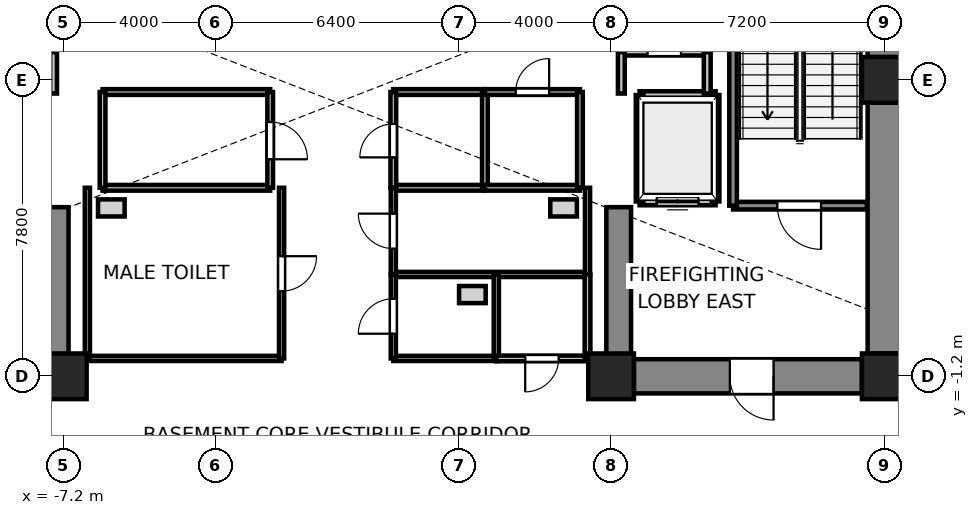
"""IFC4 building model, lengths in metres.
Left out: names, types, materials, properties, quantities, classifications, styles, units other than length and angle.
Written with IfcOpenShell. Run it as: python <this file> out.ifc"""

import sys

from ifc_helpers import new_model, si_unit, direction, frame, frame_2d, origin, origin_2d, place, context, subcontext, project, spatial, rectangle, extrude, source, transform, mapped, element, fill, save


model = new_model("IFC4")
c1 = context("Model", 3, precision=1e-05, world=origin(), true_north=direction((0.0, 1.0)))
c2 = subcontext(c1, "Body", "Model", "MODEL_VIEW")
j1 = project(units=[si_unit("LENGTHUNIT", "METRE"), si_unit("PLANEANGLEUNIT", "RADIAN")], contexts=[c1])
p1 = place(None, origin())
s1 = spatial("IfcSite", under=j1, at=p1, CompositionType="ELEMENT")
p2 = place(p1, origin())
s2 = spatial("IfcBuilding", under=s1, at=p2, CompositionType="ELEMENT")
p3 = place(p2, frame((0.0, 0.0, -13.2)))
s3 = spatial("IfcBuildingStorey", under=s2, at=p3, CompositionType="ELEMENT", Elevation=-13.2)
for number, where, z_axis, x_axis in (
    (1, (-7.2, -1.2, 0.0), (0.0, 0.0, 1.0), (1.0, 0.0, 0.0)),
    (2, (7.2, -1.2, 0.0), (0.0, 0.0, 1.0), (1.0, 0.0, 0.0)),
    (3, (14.4, -1.2, 0.0), (0.0, 0.0, 1.0), (1.0, 0.0, 0.0)),
    (4, (14.4, 6.6, 0.0), (0.0, 0.0, 1.0), (1.0, 0.0, 0.0)),
):
    element("IfcColumn", number, at=place(p3, frame(where, z_axis=z_axis, x_axis=x_axis)), inside=s3, PredefinedType="COLUMN", context=c2, shape_type="SweptSolid", body=[
        extrude(rectangle(XDim=1.2, YDim=1.2, at=origin_2d()), origin(), (0.0, 0.0, 1.0), 4.4),
    ])
p4 = place(p3, frame((14.4, -0.6, 0.0), z_axis=(0.0, 0.0, 1.0), x_axis=(0.0, 1.0, 0.0)))
e5 = element("IfcWall", 5, at=p4, inside=s3, PredefinedType="SHEAR", context=c2, shape_type="SweptSolid", body=[
    extrude(rectangle(XDim=6.6, YDim=0.9, at=frame_2d((3.3, 0.0))), origin(), (0.0, 0.0, 1.0), 4.12),
])
p5 = place(p3, frame((14.4, 7.2, 0.0), z_axis=(0.0, 0.0, 1.0), x_axis=(0.0, 1.0, 0.0)))
e6 = element("IfcWall", 6, at=p5, inside=s3, PredefinedType="SHEAR", context=c2, shape_type="SweptSolid", body=[
    extrude(rectangle(XDim=5.7, YDim=0.9, at=frame_2d((2.85, 0.0))), origin(), (0.0, 0.0, 1.0), 4.12),
])
p6 = place(p3, frame((13.8, -1.2, 0.0), z_axis=(0.0, 0.0, 1.0), x_axis=(-1.0, 0.0, 0.0)))
e7 = element("IfcWall", 7, at=p6, inside=s3, PredefinedType="SHEAR", context=c2, shape_type="SweptSolid", body=[
    extrude(rectangle(XDim=6.0, YDim=0.9, at=frame_2d((3.0, 0.0))), origin(), (0.0, 0.0, 1.0), 4.12),
])
p7 = place(p6, frame((2.325, 0.0, 0.0)))
e8 = element("IfcOpeningElement", 8, at=p7, cuts=e7, PredefinedType="OPENING", context=c2, shape_type="SweptSolid", body=[
    extrude(rectangle(XDim=1.15, YDim=2.15, at=frame_2d((0.575, 1.075))), frame((0.0, 0.46, 0.0), z_axis=(0.0, -1.0, 0.0), x_axis=(1.0, 0.0, 0.0)), (0.0, 0.0, 1.0), 0.92),
])
for number, where, z_axis, x_axis in (
    (9, (-7.4, -0.75, 0.0), (0.0, 0.0, 1.0), (0.0, 1.0, 0.0)),
    (10, (7.4, -0.75, 0.0), (0.0, 0.0, 1.0), (0.0, 1.0, 0.0)),
):
    element("IfcWall", number, at=place(p3, frame(where, z_axis=z_axis, x_axis=x_axis)), inside=s3, PredefinedType="SHEAR", context=c2, shape_type="SweptSolid", body=[
        extrude(rectangle(XDim=4.0, YDim=0.65, at=frame_2d((2.0, 0.0))), origin(), (0.0, 0.0, 1.0), 4.12),
    ])
p8 = place(p3, frame((9.95, 3.4, 0.0), z_axis=(0.0, 0.0, 1.0), x_axis=(-1.0, 0.0, 0.0)))
e11 = element("IfcWall", 11, at=p8, inside=s3, PredefinedType="SOLIDWALL", context=c2, shape_type="SweptSolid", body=[
    extrude(rectangle(XDim=2.0, YDim=0.2, at=frame_2d((1.0, 0.0))), origin(), (0.0, 0.0, 1.0), 4.12),
])
p9 = place(p8, frame((0.45, 0.0, 0.0)))
e12 = element("IfcOpeningElement", 12, at=p9, cuts=e11, PredefinedType="OPENING", context=c2, shape_type="SweptSolid", body=[
    extrude(rectangle(XDim=1.1, YDim=2.2, at=frame_2d((0.55, 1.1))), frame((0.0, 0.11, 0.0), z_axis=(0.0, -1.0, 0.0), x_axis=(1.0, 0.0, 0.0)), (0.0, 0.0, 1.0), 0.22),
])
p10 = place(p3, frame((7.95, 6.2, 0.0), z_axis=(0.0, 0.0, 1.0), x_axis=(1.0, 0.0, 0.0)))
e13 = element("IfcWall", 13, at=p10, inside=s3, PredefinedType="SOLIDWALL", context=c2, shape_type="SweptSolid", body=[
    extrude(rectangle(XDim=2.0, YDim=0.2, at=frame_2d((1.0, 0.0))), origin(), (0.0, 0.0, 1.0), 4.12),
])
for number, where, z_axis, x_axis in (
    (14, (7.95, 3.4, 0.0), (0.0, 0.0, 1.0), (0.0, 1.0, 0.0)),
    (15, (9.95, 6.2, 0.0), (0.0, 0.0, 1.0), (0.0, -1.0, 0.0)),
):
    element("IfcWall", number, at=place(p3, frame(where, z_axis=z_axis, x_axis=x_axis)), inside=s3, PredefinedType="SOLIDWALL", context=c2, shape_type="SweptSolid", body=[
        extrude(rectangle(XDim=2.8, YDim=0.2, at=frame_2d((1.4, 0.0))), origin(), (0.0, 0.0, 1.0), 4.12),
    ])
p11 = place(p3, frame((13.93, 3.29, 0.0), z_axis=(0.0, 0.0, 1.0), x_axis=(-1.0, 0.0, 0.0)))
e16 = element("IfcWall", 16, at=p11, inside=s3, PredefinedType="SOLIDWALL", context=c2, shape_type="SweptSolid", body=[
    extrude(rectangle(XDim=3.52, YDim=0.2, at=frame_2d((1.76, 0.0))), origin(), (0.0, 0.0, 1.0), 4.12),
])
p12 = place(p11, frame((1.205, 0.0, 0.0)))
e17 = element("IfcOpeningElement", 17, at=p12, cuts=e16, PredefinedType="OPENING", context=c2, shape_type="SweptSolid", body=[
    extrude(rectangle(XDim=1.15, YDim=2.15, at=frame_2d((0.575, 1.075))), frame((0.0, 0.11, 0.0), z_axis=(0.0, -1.0, 0.0), x_axis=(1.0, 0.0, 0.0)), (0.0, 0.0, 1.0), 0.22),
])
p13 = place(p3, frame((10.41, 3.29, 0.0), z_axis=(0.0, 0.0, 1.0), x_axis=(0.0, 1.0, 0.0)))
e18 = element("IfcWall", 18, at=p13, inside=s3, PredefinedType="SOLIDWALL", context=c2, shape_type="SweptSolid", body=[
    extrude(rectangle(XDim=8.84, YDim=0.2, at=frame_2d((4.42, 0.0))), origin(), (0.0, 0.0, 1.0), 4.12),
])
p14 = place(p3, frame((-9.73, 7.33, 0.0), z_axis=(0.0, 0.0, 1.0), x_axis=(1.0, 0.0, 0.0)))
e19 = element("IfcWall", 19, at=p14, inside=s3, PredefinedType="PARTITIONING", context=c2, shape_type="SweptSolid", body=[
    extrude(rectangle(XDim=2.26, YDim=0.18, at=frame_2d((1.13, 0.0))), origin(), (0.0, 0.0, 1.0), 3.41),
])
p15 = place(p14, frame((0.69, 0.0, 0.0)))
e20 = element("IfcOpeningElement", 20, at=p15, cuts=e19, PredefinedType="OPENING", context=c2, shape_type="SweptSolid", body=[
    extrude(rectangle(XDim=0.88, YDim=2.1, at=frame_2d((0.44, 1.05))), frame((0.0, 0.1, 0.0), z_axis=(0.0, -1.0, 0.0), x_axis=(1.0, 0.0, 0.0)), (0.0, 0.0, 1.0), 0.2),
])
p16 = place(p3, frame((-7.47, 7.33, 0.0), z_axis=(0.0, 0.0, 1.0), x_axis=(0.0, -1.0, 0.0)))
e21 = element("IfcWall", 21, at=p16, inside=s3, PredefinedType="PARTITIONING", context=c2, shape_type="SweptSolid", body=[
    extrude(rectangle(XDim=1.09, YDim=0.18, at=frame_2d((0.545, 0.0))), origin(), (0.0, 0.0, 1.0), 3.41),
])
p17 = place(p3, frame((7.47, 7.33, 0.0), z_axis=(0.0, 0.0, 1.0), x_axis=(1.0, 0.0, 0.0)))
e22 = element("IfcWall", 22, at=p17, inside=s3, PredefinedType="PARTITIONING", context=c2, shape_type="SweptSolid", body=[
    extrude(rectangle(XDim=2.26, YDim=0.18, at=frame_2d((1.13, 0.0))), origin(), (0.0, 0.0, 1.0), 3.41),
])
p18 = place(p17, frame((0.69, 0.0, 0.0)))
e23 = element("IfcOpeningElement", 23, at=p18, cuts=e22, PredefinedType="OPENING", context=c2, shape_type="SweptSolid", body=[
    extrude(rectangle(XDim=0.88, YDim=2.1, at=frame_2d((0.44, 1.05))), frame((0.0, 0.1, 0.0), z_axis=(0.0, -1.0, 0.0), x_axis=(1.0, 0.0, 0.0)), (0.0, 0.0, 1.0), 0.2),
])
p19 = place(p3, frame((7.47, 6.24, 0.0), z_axis=(0.0, 0.0, 1.0), x_axis=(0.0, 1.0, 0.0)))
e24 = element("IfcWall", 24, at=p19, inside=s3, PredefinedType="PARTITIONING", context=c2, shape_type="SweptSolid", body=[
    extrude(rectangle(XDim=1.09, YDim=0.18, at=frame_2d((0.545, 0.0))), origin(), (0.0, 0.0, 1.0), 3.41),
])
p20 = place(p3, frame((9.73, 7.33, 0.0), z_axis=(0.0, 0.0, 1.0), x_axis=(0.0, -1.0, 0.0)))
e25 = element("IfcWall", 25, at=p20, inside=s3, PredefinedType="PARTITIONING", context=c2, shape_type="SweptSolid", body=[
    extrude(rectangle(XDim=1.09, YDim=0.18, at=frame_2d((0.545, 0.0))), origin(), (0.0, 0.0, 1.0), 4.12),
])
for number, where, z_axis, x_axis in (
    (26, (-1.77, 3.76, 0.0), (0.0, 0.0, 1.0), (-1.0, 0.0, 0.0)),
    (27, (-6.18, 6.28, 0.0), (0.0, 0.0, 1.0), (1.0, 0.0, 0.0)),
):
    element("IfcWall", number, at=place(p3, frame(where, z_axis=z_axis, x_axis=x_axis)), inside=s3, PredefinedType="PARTITIONING", context=c2, shape_type="SweptSolid", body=[
        extrude(rectangle(XDim=4.41, YDim=0.15, at=frame_2d((2.205, 0.0))), origin(), (0.0, 0.0, 1.0), 4.12),
    ])
p21 = place(p3, frame((-6.18, 3.76, 0.0), z_axis=(0.0, 0.0, 1.0), x_axis=(0.0, 1.0, 0.0)))
e28 = element("IfcWall", 28, at=p21, inside=s3, PredefinedType="PARTITIONING", context=c2, shape_type="SweptSolid", body=[
    extrude(rectangle(XDim=2.52, YDim=0.15, at=frame_2d((1.26, 0.0))), origin(), (0.0, 0.0, 1.0), 4.12),
])
p22 = place(p3, frame((-1.77, 6.28, 0.0), z_axis=(0.0, 0.0, 1.0), x_axis=(0.0, -1.0, 0.0)))
e29 = element("IfcWall", 29, at=p22, inside=s3, PredefinedType="PARTITIONING", context=c2, shape_type="SweptSolid", body=[
    extrude(rectangle(XDim=2.52, YDim=0.15, at=frame_2d((1.26, 0.0))), origin(), (0.0, 0.0, 1.0), 4.12),
])
p23 = place(p22, frame((0.79, 0.0, 0.0)))
e30 = element("IfcOpeningElement", 30, at=p23, cuts=e29, PredefinedType="OPENING", context=c2, shape_type="SweptSolid", body=[
    extrude(rectangle(XDim=0.98, YDim=2.15, at=frame_2d((0.49, 1.075))), frame((0.0, 0.085, 0.0), z_axis=(0.0, -1.0, 0.0), x_axis=(1.0, 0.0, 0.0)), (0.0, 0.0, 1.0), 0.17),
])
for number, where, z_axis, x_axis in (
    (31, (3.88, 3.76, 0.0), (0.0, 0.0, 1.0), (-1.0, 0.0, 0.0)),
    (32, (1.47, 6.28, 0.0), (0.0, 0.0, 1.0), (1.0, 0.0, 0.0)),
):
    element("IfcWall", number, at=place(p3, frame(where, z_axis=z_axis, x_axis=x_axis)), inside=s3, PredefinedType="PARTITIONING", context=c2, shape_type="SweptSolid", body=[
        extrude(rectangle(XDim=2.41, YDim=0.15, at=frame_2d((1.205, 0.0))), origin(), (0.0, 0.0, 1.0), 4.12),
    ])
p24 = place(p3, frame((1.47, 3.76, 0.0), z_axis=(0.0, 0.0, 1.0), x_axis=(0.0, 1.0, 0.0)))
e33 = element("IfcWall", 33, at=p24, inside=s3, PredefinedType="PARTITIONING", context=c2, shape_type="SweptSolid", body=[
    extrude(rectangle(XDim=2.52, YDim=0.15, at=frame_2d((1.26, 0.0))), origin(), (0.0, 0.0, 1.0), 4.12),
])
p25 = place(p24, frame((0.8, 0.0, 0.0)))
e34 = element("IfcOpeningElement", 34, at=p25, cuts=e33, PredefinedType="OPENING", context=c2, shape_type="SweptSolid", body=[
    extrude(rectangle(XDim=0.88, YDim=2.1, at=frame_2d((0.44, 1.05))), frame((0.0, 0.085, 0.0), z_axis=(0.0, -1.0, 0.0), x_axis=(1.0, 0.0, 0.0)), (0.0, 0.0, 1.0), 0.17),
])
p26 = place(p3, frame((3.88, 6.28, 0.0), z_axis=(0.0, 0.0, 1.0), x_axis=(0.0, -1.0, 0.0)))
e35 = element("IfcWall", 35, at=p26, inside=s3, PredefinedType="PARTITIONING", context=c2, shape_type="SweptSolid", body=[
    extrude(rectangle(XDim=2.52, YDim=0.15, at=frame_2d((1.26, 0.0))), origin(), (0.0, 0.0, 1.0), 4.12),
])
p27 = place(p3, frame((6.38, 3.76, 0.0), z_axis=(0.0, 0.0, 1.0), x_axis=(-1.0, 0.0, 0.0)))
e36 = element("IfcWall", 36, at=p27, inside=s3, PredefinedType="PARTITIONING", context=c2, shape_type="SweptSolid", body=[
    extrude(rectangle(XDim=2.5, YDim=0.15, at=frame_2d((1.25, 0.0))), origin(), (0.0, 0.0, 1.0), 4.12),
])
p28 = place(p3, frame((3.88, 6.28, 0.0), z_axis=(0.0, 0.0, 1.0), x_axis=(1.0, 0.0, 0.0)))
e37 = element("IfcWall", 37, at=p28, inside=s3, PredefinedType="PARTITIONING", context=c2, shape_type="SweptSolid", body=[
    extrude(rectangle(XDim=2.5, YDim=0.15, at=frame_2d((1.25, 0.0))), origin(), (0.0, 0.0, 1.0), 4.12),
])
p29 = place(p28, frame((0.81, 0.0, 0.0)))
e38 = element("IfcOpeningElement", 38, at=p29, cuts=e37, PredefinedType="OPENING", context=c2, shape_type="SweptSolid", body=[
    extrude(rectangle(XDim=0.88, YDim=2.15, at=frame_2d((0.44, 1.075))), frame((0.0, 0.085, 0.0), z_axis=(0.0, -1.0, 0.0), x_axis=(1.0, 0.0, 0.0)), (0.0, 0.0, 1.0), 0.17),
])
p30 = place(p3, frame((6.38, 6.28, 0.0), z_axis=(0.0, 0.0, 1.0), x_axis=(0.0, -1.0, 0.0)))
e39 = element("IfcWall", 39, at=p30, inside=s3, PredefinedType="PARTITIONING", context=c2, shape_type="SweptSolid", body=[
    extrude(rectangle(XDim=2.52, YDim=0.15, at=frame_2d((1.26, 0.0))), origin(), (0.0, 0.0, 1.0), 4.12),
])
p31 = place(p3, frame((-1.47, -0.73, 0.0), z_axis=(0.0, 0.0, 1.0), x_axis=(-1.0, 0.0, 0.0)))
e40 = element("IfcWall", 40, at=p31, inside=s3, PredefinedType="PARTITIONING", context=c2, shape_type="SweptSolid", body=[
    extrude(rectangle(XDim=5.11, YDim=0.135, at=frame_2d((2.555, 0.0))), origin(), (0.0, 0.0, 1.0), 4.12),
])
p32 = place(p3, frame((-6.58, -0.73, 0.0), z_axis=(0.0, 0.0, 1.0), x_axis=(0.0, 1.0, 0.0)))
e41 = element("IfcWall", 41, at=p32, inside=s3, PredefinedType="PARTITIONING", context=c2, shape_type="SweptSolid", body=[
    extrude(rectangle(XDim=4.49, YDim=0.135, at=frame_2d((2.245, 0.0))), origin(), (0.0, 0.0, 1.0), 3.493),
])
p33 = place(p3, frame((-1.47, 3.76, 0.0), z_axis=(0.0, 0.0, 1.0), x_axis=(0.0, -1.0, 0.0)))
e42 = element("IfcWall", 42, at=p33, inside=s3, PredefinedType="PARTITIONING", context=c2, shape_type="SweptSolid", body=[
    extrude(rectangle(XDim=4.49, YDim=0.135, at=frame_2d((2.245, 0.0))), origin(), (0.0, 0.0, 1.0), 3.493),
])
p34 = place(p33, frame((1.8, 0.0, 0.0)))
e43 = element("IfcOpeningElement", 43, at=p34, cuts=e42, PredefinedType="OPENING", context=c2, shape_type="SweptSolid", body=[
    extrude(rectangle(XDim=0.92, YDim=2.1, at=frame_2d((0.46, 1.05))), frame((0.0, 0.077, 0.0), z_axis=(0.0, -1.0, 0.0), x_axis=(1.0, 0.0, 0.0)), (0.0, 0.0, 1.0), 0.155),
])
p35 = place(p3, frame((6.58, 1.48, 0.0), z_axis=(0.0, 0.0, 1.0), x_axis=(-1.0, 0.0, 0.0)))
e44 = element("IfcWall", 44, at=p35, inside=s3, PredefinedType="PARTITIONING", context=c2, shape_type="SweptSolid", body=[
    extrude(rectangle(XDim=5.11, YDim=0.135, at=frame_2d((2.555, 0.0))), origin(), (0.0, 0.0, 1.0), 4.12),
])
p36 = place(p3, frame((1.47, 1.48, 0.0), z_axis=(0.0, 0.0, 1.0), x_axis=(0.0, 1.0, 0.0)))
e45 = element("IfcWall", 45, at=p36, inside=s3, PredefinedType="PARTITIONING", context=c2, shape_type="SweptSolid", body=[
    extrude(rectangle(XDim=2.28, YDim=0.135, at=frame_2d((1.14, 0.0))), origin(), (0.0, 0.0, 1.0), 3.493),
])
p37 = place(p36, frame((0.68, 0.0, 0.0)))
e46 = element("IfcOpeningElement", 46, at=p37, cuts=e45, PredefinedType="OPENING", context=c2, shape_type="SweptSolid", body=[
    extrude(rectangle(XDim=0.92, YDim=2.1, at=frame_2d((0.46, 1.05))), frame((0.0, 0.077, 0.0), z_axis=(0.0, -1.0, 0.0), x_axis=(1.0, 0.0, 0.0)), (0.0, 0.0, 1.0), 0.155),
])
p38 = place(p3, frame((6.58, 3.76, 0.0), z_axis=(0.0, 0.0, 1.0), x_axis=(0.0, -1.0, 0.0)))
e47 = element("IfcWall", 47, at=p38, inside=s3, PredefinedType="PARTITIONING", context=c2, shape_type="SweptSolid", body=[
    extrude(rectangle(XDim=2.28, YDim=0.135, at=frame_2d((1.14, 0.0))), origin(), (0.0, 0.0, 1.0), 3.493),
])
p39 = place(p3, frame((4.18, -0.73, 0.0), z_axis=(0.0, 0.0, 1.0), x_axis=(-1.0, 0.0, 0.0)))
e48 = element("IfcWall", 48, at=p39, inside=s3, PredefinedType="PARTITIONING", context=c2, shape_type="SweptSolid", body=[
    extrude(rectangle(XDim=2.71, YDim=0.135, at=frame_2d((1.355, 0.0))), origin(), (0.0, 0.0, 1.0), 4.12),
])
p40 = place(p3, frame((1.47, -0.73, 0.0), z_axis=(0.0, 0.0, 1.0), x_axis=(0.0, 1.0, 0.0)))
e49 = element("IfcWall", 49, at=p40, inside=s3, PredefinedType="PARTITIONING", context=c2, shape_type="SweptSolid", body=[
    extrude(rectangle(XDim=2.21, YDim=0.135, at=frame_2d((1.105, 0.0))), origin(), (0.0, 0.0, 1.0), 4.12),
])
p41 = place(p40, frame((0.65, 0.0, 0.0)))
e50 = element("IfcOpeningElement", 50, at=p41, cuts=e49, PredefinedType="OPENING", context=c2, shape_type="SweptSolid", body=[
    extrude(rectangle(XDim=0.92, YDim=2.1, at=frame_2d((0.46, 1.05))), frame((0.0, 0.077, 0.0), z_axis=(0.0, -1.0, 0.0), x_axis=(1.0, 0.0, 0.0)), (0.0, 0.0, 1.0), 0.155),
])
p42 = place(p3, frame((4.18, 1.48, 0.0), z_axis=(0.0, 0.0, 1.0), x_axis=(0.0, -1.0, 0.0)))
e51 = element("IfcWall", 51, at=p42, inside=s3, PredefinedType="PARTITIONING", context=c2, shape_type="SweptSolid", body=[
    extrude(rectangle(XDim=2.21, YDim=0.135, at=frame_2d((1.105, 0.0))), origin(), (0.0, 0.0, 1.0), 4.12),
])
p43 = place(p3, frame((6.58, -0.73, 0.0), z_axis=(0.0, 0.0, 1.0), x_axis=(-1.0, 0.0, 0.0)))
e52 = element("IfcWall", 52, at=p43, inside=s3, PredefinedType="PARTITIONING", context=c2, shape_type="SweptSolid", body=[
    extrude(rectangle(XDim=2.4, YDim=0.15, at=frame_2d((1.2, 0.0))), origin(), (0.0, 0.0, 1.0), 4.12),
])
p44 = place(p43, frame((0.76, 0.0, 0.0)))
e53 = element("IfcOpeningElement", 53, at=p44, cuts=e52, PredefinedType="OPENING", context=c2, shape_type="SweptSolid", body=[
    extrude(rectangle(XDim=0.88, YDim=2.1, at=frame_2d((0.44, 1.05))), frame((0.0, 0.085, 0.0), z_axis=(0.0, -1.0, 0.0), x_axis=(1.0, 0.0, 0.0)), (0.0, 0.0, 1.0), 0.17),
])
p45 = place(p3, frame((6.58, 1.48, 0.0), z_axis=(0.0, 0.0, 1.0), x_axis=(0.0, -1.0, 0.0)))
e54 = element("IfcWall", 54, at=p45, inside=s3, PredefinedType="PARTITIONING", context=c2, shape_type="SweptSolid", body=[
    extrude(rectangle(XDim=2.21, YDim=0.15, at=frame_2d((1.105, 0.0))), origin(), (0.0, 0.0, 1.0), 4.12),
])
m1 = source(origin(), c2, "Body", "SweptSolid", [
    extrude(rectangle(XDim=1.1, YDim=2.2, at=frame_2d((0.55, 1.1))), frame((0.0, 0.025, 0.0), z_axis=(0.0, -1.0, 0.0), x_axis=(1.0, 0.0, 0.0)), (0.0, 0.0, 1.0), 0.05),
])
p46 = place(p9, origin())
e55 = element("IfcDoor", 55, at=p46, inside=s3, OperationType="DOUBLE_DOOR_SLIDING", PredefinedType="DOOR", context=c2, shape_type="MappedRepresentation", body=[
    mapped(m1, transform((0.0, 0.0, 0.0), x_axis=(1.0, 0.0, 0.0), y_axis=(0.0, 1.0, 0.0), z_axis=(0.0, 0.0, 1.0), scale=1.0)),
])
fill(e12, e55)
m2 = source(origin(), c2, "Body", "SweptSolid", [
    extrude(rectangle(XDim=1.15, YDim=2.15, at=frame_2d((0.575, 1.075))), frame((0.0, 0.025, 0.0), z_axis=(0.0, -1.0, 0.0), x_axis=(1.0, 0.0, 0.0)), (0.0, 0.0, 1.0), 0.05),
])
p47 = place(p12, origin())
e56 = element("IfcDoor", 56, at=p47, inside=s3, OperationType="SINGLE_SWING_LEFT", PredefinedType="DOOR", context=c2, shape_type="MappedRepresentation", body=[
    mapped(m2, transform((0.0, 0.0, 0.0), x_axis=(1.0, 0.0, 0.0), y_axis=(0.0, 1.0, 0.0), z_axis=(0.0, 0.0, 1.0), scale=1.0)),
])
fill(e17, e56)
p48 = place(p7, origin())
e57 = element("IfcDoor", 57, at=p48, inside=s3, OperationType="SINGLE_SWING_LEFT", PredefinedType="DOOR", context=c2, shape_type="MappedRepresentation", body=[
    mapped(m2, transform((0.0, 0.0, 0.0), x_axis=(1.0, 0.0, 0.0), y_axis=(0.0, 1.0, 0.0), z_axis=(0.0, 0.0, 1.0), scale=1.0)),
])
fill(e8, e57)
m3 = source(origin(), c2, "Body", "SweptSolid", [
    extrude(rectangle(XDim=0.98, YDim=2.15, at=frame_2d((0.49, 1.075))), frame((0.0, 0.025, 0.0), z_axis=(0.0, -1.0, 0.0), x_axis=(1.0, 0.0, 0.0)), (0.0, 0.0, 1.0), 0.05),
])
p49 = place(p23, origin())
e58 = element("IfcDoor", 58, at=p49, inside=s3, OperationType="SINGLE_SWING_RIGHT", PredefinedType="DOOR", context=c2, shape_type="MappedRepresentation", body=[
    mapped(m3, transform((0.0, 0.0, 0.0), x_axis=(1.0, 0.0, 0.0), y_axis=(0.0, 1.0, 0.0), z_axis=(0.0, 0.0, 1.0), scale=1.0)),
])
fill(e30, e58)
m4 = source(origin(), c2, "Body", "SweptSolid", [
    extrude(rectangle(XDim=0.88, YDim=2.1, at=frame_2d((0.44, 1.05))), frame((0.0, 0.025, 0.0), z_axis=(0.0, -1.0, 0.0), x_axis=(1.0, 0.0, 0.0)), (0.0, 0.0, 1.0), 0.05),
])
p50 = place(p25, origin())
e59 = element("IfcDoor", 59, at=p50, inside=s3, OperationType="SINGLE_SWING_LEFT", PredefinedType="DOOR", context=c2, shape_type="MappedRepresentation", body=[
    mapped(m4, transform((0.0, 0.0, 0.0), x_axis=(1.0, 0.0, 0.0), y_axis=(0.0, 1.0, 0.0), z_axis=(0.0, 0.0, 1.0), scale=1.0)),
])
fill(e34, e59)
m5 = source(origin(), c2, "Body", "SweptSolid", [
    extrude(rectangle(XDim=0.88, YDim=2.15, at=frame_2d((0.44, 1.075))), frame((0.0, 0.025, 0.0), z_axis=(0.0, -1.0, 0.0), x_axis=(1.0, 0.0, 0.0)), (0.0, 0.0, 1.0), 0.05),
])
p51 = place(p29, origin())
e60 = element("IfcDoor", 60, at=p51, inside=s3, OperationType="SINGLE_SWING_RIGHT", PredefinedType="DOOR", context=c2, shape_type="MappedRepresentation", body=[
    mapped(m5, transform((0.0, 0.0, 0.0), x_axis=(1.0, 0.0, 0.0), y_axis=(0.0, 1.0, 0.0), z_axis=(0.0, 0.0, 1.0), scale=1.0)),
])
fill(e38, e60)
m6 = source(origin(), c2, "Body", "SweptSolid", [
    extrude(rectangle(XDim=0.92, YDim=2.1, at=frame_2d((0.46, 1.05))), frame((0.0, 0.025, 0.0), z_axis=(0.0, -1.0, 0.0), x_axis=(1.0, 0.0, 0.0)), (0.0, 0.0, 1.0), 0.05),
])
p52 = place(p34, origin())
e61 = element("IfcDoor", 61, at=p52, inside=s3, OperationType="SINGLE_SWING_LEFT", PredefinedType="DOOR", context=c2, shape_type="MappedRepresentation", body=[
    mapped(m6, transform((0.0, 0.0, 0.0), x_axis=(1.0, 0.0, 0.0), y_axis=(0.0, 1.0, 0.0), z_axis=(0.0, 0.0, 1.0), scale=1.0)),
])
fill(e43, e61)
p53 = place(p37, origin())
e62 = element("IfcDoor", 62, at=p53, inside=s3, OperationType="SINGLE_SWING_RIGHT", PredefinedType="DOOR", context=c2, shape_type="MappedRepresentation", body=[
    mapped(m6, transform((0.0, 0.0, 0.0), x_axis=(1.0, 0.0, 0.0), y_axis=(0.0, 1.0, 0.0), z_axis=(0.0, 0.0, 1.0), scale=1.0)),
])
fill(e46, e62)
p54 = place(p41, origin())
e63 = element("IfcDoor", 63, at=p54, inside=s3, OperationType="SINGLE_SWING_LEFT", PredefinedType="DOOR", context=c2, shape_type="MappedRepresentation", body=[
    mapped(m6, transform((0.0, 0.0, 0.0), x_axis=(1.0, 0.0, 0.0), y_axis=(0.0, 1.0, 0.0), z_axis=(0.0, 0.0, 1.0), scale=1.0)),
])
fill(e50, e63)
p55 = place(p44, origin())
e64 = element("IfcDoor", 64, at=p55, inside=s3, OperationType="SINGLE_SWING_RIGHT", PredefinedType="DOOR", context=c2, shape_type="MappedRepresentation", body=[
    mapped(m4, transform((0.0, 0.0, 0.0), x_axis=(1.0, 0.0, 0.0), y_axis=(0.0, 1.0, 0.0), z_axis=(0.0, 0.0, 1.0), scale=1.0)),
])
fill(e53, e64)
p56 = place(p18, origin())
e65 = element("IfcDoor", 65, at=p56, inside=s3, OperationType="SINGLE_SWING_RIGHT", PredefinedType="DOOR", context=c2, shape_type="MappedRepresentation", body=[
    mapped(m4, transform((0.0, 0.0, 0.0), x_axis=(1.0, 0.0, 0.0), y_axis=(0.0, 1.0, 0.0), z_axis=(0.0, 0.0, 1.0), scale=1.0)),
])
fill(e23, e65)
save(model, sys.argv[1])
